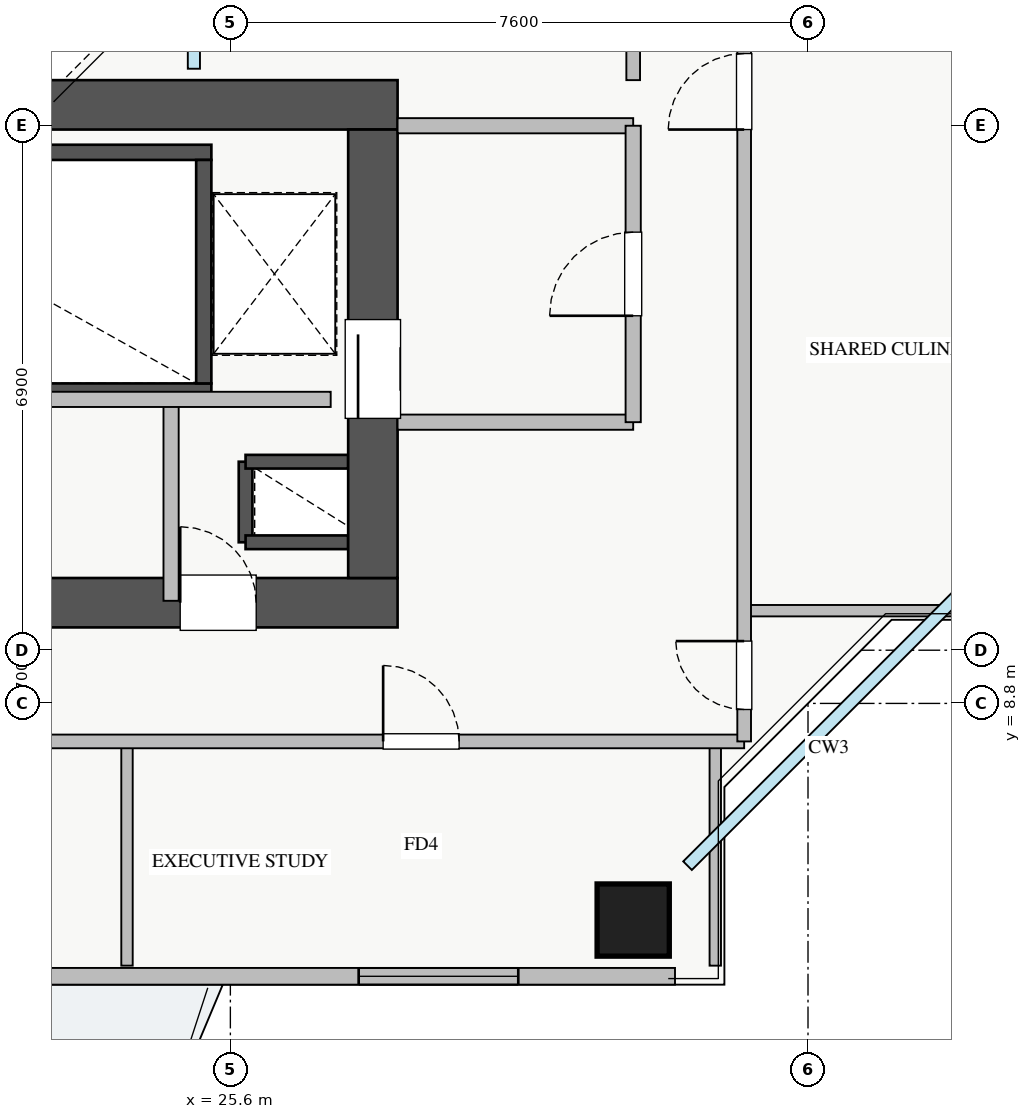
"""IFC4 building model, lengths in metres.
Left out: names, types, materials, properties, quantities, classifications, styles, units other than length and angle.
Written with IfcOpenShell. Run it as: python <this file> out.ifc"""

import sys

from ifc_helpers import new_model, si_unit, direction, frame, frame_2d, origin, origin_2d, place, context, subcontext, project, spatial, rectangle, extrude, source, transform, mapped, element, fill, save


model = new_model("IFC4")
c1 = context("Model", 3, precision=1e-05, world=origin(), true_north=direction((0.0, 1.0)))
c2 = subcontext(c1, "Body", "Model", "MODEL_VIEW")
j1 = project(units=[si_unit("LENGTHUNIT", "METRE"), si_unit("PLANEANGLEUNIT", "RADIAN")], contexts=[c1])
p1 = place(None, origin())
s1 = spatial("IfcSite", under=j1, at=p1, CompositionType="ELEMENT")
p2 = place(p1, origin())
s2 = spatial("IfcBuilding", under=s1, at=p2, CompositionType="ELEMENT")
p3 = place(p2, frame((0.0, 0.0, 147.0)))
s3 = spatial("IfcBuildingStorey", under=s2, at=p3, CompositionType="ELEMENT", Elevation=147.0)
p4 = place(p3, frame((25.8, 10.92, 0.0), z_axis=(0.0, 0.0, 1.0), x_axis=(0.0, 1.0, 0.0)))
e1 = element("IfcWall", 1, at=p4, inside=s3, PredefinedType="SHEAR", context=c2, shape_type="SweptSolid", body=[
    extrude(rectangle(XDim=1.06, YDim=0.18, at=frame_2d((0.53, 0.0))), origin(), (0.0, 0.0, 1.0), 3.07),
])
for number, where, z_axis, x_axis in (
    (2, (25.8, 11.98, 0.0), (0.0, 0.0, 1.0), (1.0, 0.0, 0.0)),
    (3, (25.8, 10.92, 0.0), (0.0, 0.0, 1.0), (1.0, 0.0, 0.0)),
):
    element("IfcWall", number, at=place(p3, frame(where, z_axis=z_axis, x_axis=x_axis)), inside=s3, PredefinedType="SHEAR", context=c2, shape_type="SweptSolid", body=[
        extrude(rectangle(XDim=1.35, YDim=0.18, at=frame_2d((0.675, 0.0))), origin(), (0.0, 0.0, 1.0), 3.07),
    ])
p5 = place(p3, frame((18.2, 12.91, 0.0), z_axis=(0.0, 0.0, 1.0), x_axis=(1.0, 0.0, 0.0)))
e4 = element("IfcWall", 4, at=p5, inside=s3, PredefinedType="SHEAR", context=c2, shape_type="SweptSolid", body=[
    extrude(rectangle(XDim=7.15, YDim=0.2, at=frame_2d((3.575, 0.0))), origin(), (0.0, 0.0, 1.0), 3.25),
])
p6 = place(p5, frame((0.35, 0.0, 0.0)))
e5 = element("IfcOpeningElement", 5, at=p6, cuts=e4, PredefinedType="OPENING", context=c2, shape_type="SweptSolid", body=[
    extrude(rectangle(XDim=1.1, YDim=2.05, at=frame_2d((0.55, 1.025))), frame((0.0, 0.11, 0.0), z_axis=(0.0, -1.0, 0.0), x_axis=(1.0, 0.0, 0.0)), (0.0, 0.0, 1.0), 0.22),
])
p7 = place(p3, frame((18.2, 16.05, 0.0), z_axis=(0.0, 0.0, 1.0), x_axis=(1.0, 0.0, 0.0)))
e6 = element("IfcWall", 6, at=p7, inside=s3, PredefinedType="SHEAR", context=c2, shape_type="SweptSolid", body=[
    extrude(rectangle(XDim=7.15, YDim=0.2, at=frame_2d((3.575, 0.0))), origin(), (0.0, 0.0, 1.0), 3.25),
])
p8 = place(p3, frame((25.25, 13.01, 0.0), z_axis=(0.0, 0.0, 1.0), x_axis=(0.0, 1.0, 0.0)))
e7 = element("IfcWall", 7, at=p8, inside=s3, PredefinedType="SHEAR", context=c2, shape_type="SweptSolid", body=[
    extrude(rectangle(XDim=2.94, YDim=0.2, at=frame_2d((1.47, 0.0))), origin(), (0.0, 0.0, 1.0), 3.25),
])
p9 = place(p3, frame((10.2, 10.125, 0.0), z_axis=(0.0, 0.0, 1.0), x_axis=(1.0, 0.0, 0.0)))
e8 = element("IfcWall", 8, at=p9, inside=s3, PredefinedType="SHEAR", context=c2, shape_type="SweptSolid", body=[
    extrude(rectangle(XDim=17.6, YDim=0.65, at=frame_2d((8.8, 0.0))), origin(), (0.0, 0.0, 1.0), 3.25),
])
p10 = place(p9, frame((1.15, 0.0, 0.0)))
e9 = element("IfcOpeningElement", 9, at=p10, cuts=e8, PredefinedType="OPENING", context=c2, shape_type="SweptSolid", body=[
    extrude(rectangle(XDim=1.1, YDim=2.05, at=frame_2d((0.55, 1.025))), frame((0.0, 0.335, 0.0), z_axis=(0.0, -1.0, 0.0), x_axis=(1.0, 0.0, 0.0)), (0.0, 0.0, 1.0), 0.67),
])
p11 = place(p9, frame((8.3, 0.0, 0.0)))
e10 = element("IfcOpeningElement", 10, at=p11, cuts=e8, PredefinedType="OPENING", context=c2, shape_type="SweptSolid", body=[
    extrude(rectangle(XDim=1.1, YDim=2.05, at=frame_2d((0.55, 1.025))), frame((0.0, 0.335, 0.0), z_axis=(0.0, -1.0, 0.0), x_axis=(1.0, 0.0, 0.0)), (0.0, 0.0, 1.0), 0.67),
])
p12 = place(p9, frame((4.9, 0.0, 0.0)))
e11 = element("IfcOpeningElement", 11, at=p12, cuts=e8, PredefinedType="OPENING", context=c2, shape_type="SweptSolid", body=[
    extrude(rectangle(XDim=1.1, YDim=2.05, at=frame_2d((0.55, 1.025))), frame((0.0, 0.335, 0.0), z_axis=(0.0, -1.0, 0.0), x_axis=(1.0, 0.0, 0.0)), (0.0, 0.0, 1.0), 0.67),
])
p13 = place(p9, frame((14.74, 0.0, 0.0)))
e12 = element("IfcOpeningElement", 12, at=p13, cuts=e8, PredefinedType="OPENING", context=c2, shape_type="SweptSolid", body=[
    extrude(rectangle(XDim=1.0, YDim=2.05, at=frame_2d((0.5, 1.025))), frame((0.0, 0.335, 0.0), z_axis=(0.0, -1.0, 0.0), x_axis=(1.0, 0.0, 0.0)), (0.0, 0.0, 1.0), 0.67),
])
p14 = place(p9, frame((11.67, 0.0, 0.0)))
e13 = element("IfcOpeningElement", 13, at=p14, cuts=e8, PredefinedType="OPENING", context=c2, shape_type="SweptSolid", body=[
    extrude(rectangle(XDim=1.0, YDim=2.05, at=frame_2d((0.5, 1.025))), frame((0.0, 0.335, 0.0), z_axis=(0.0, -1.0, 0.0), x_axis=(1.0, 0.0, 0.0)), (0.0, 0.0, 1.0), 0.67),
])
p15 = place(p3, frame((10.2, 16.675, 0.0), z_axis=(0.0, 0.0, 1.0), x_axis=(1.0, 0.0, 0.0)))
e14 = element("IfcWall", 14, at=p15, inside=s3, PredefinedType="SHEAR", context=c2, shape_type="SweptSolid", body=[
    extrude(rectangle(XDim=17.6, YDim=0.65, at=frame_2d((8.8, 0.0))), origin(), (0.0, 0.0, 1.0), 3.25),
])
p16 = place(p3, frame((27.475, 10.45, 0.0), z_axis=(0.0, 0.0, 1.0), x_axis=(0.0, 1.0, 0.0)))
e15 = element("IfcWall", 15, at=p16, inside=s3, PredefinedType="SHEAR", context=c2, shape_type="SweptSolid", body=[
    extrude(rectangle(XDim=5.9, YDim=0.65, at=frame_2d((2.95, 0.0))), origin(), (0.0, 0.0, 1.0), 3.25),
])
p17 = place(p16, frame((2.1, 0.0, 0.0)))
e16 = element("IfcOpeningElement", 16, at=p17, cuts=e15, PredefinedType="OPENING", context=c2, shape_type="SweptSolid", body=[
    extrude(rectangle(XDim=1.3, YDim=2.05, at=frame_2d((0.65, 1.025))), frame((0.0, 0.335, 0.0), z_axis=(0.0, -1.0, 0.0), x_axis=(1.0, 0.0, 0.0)), (0.0, 0.0, 1.0), 0.67),
])
m1 = source(origin(), c2, "Body", "SweptSolid", [
    extrude(rectangle(XDim=0.95, YDim=0.95, at=origin_2d()), origin(), (0.0, 0.0, 1.0), 3.25),
])
p18 = place(p3, frame((30.9, 5.95, 0.0), z_axis=(0.0, 0.0, 1.0), x_axis=(1.0, 0.0, 0.0)))
e17 = element("IfcColumn", 17, at=p18, inside=s3, PredefinedType="COLUMN", context=c2, shape_type="MappedRepresentation", body=[
    mapped(m1, transform((0.0, 0.0, 0.0), x_axis=(1.0, 0.0, 0.0), y_axis=(0.0, 1.0, 0.0), z_axis=(0.0, 0.0, 1.0), scale=1.0)),
])
p19 = place(p3, frame((6.55, 5.21, 0.0), z_axis=(0.0, 0.0, 1.0), x_axis=(1.0, 0.0, 0.0)))
e18 = element("IfcWall", 18, at=p19, inside=s3, PredefinedType="STANDARD", context=c2, shape_type="SweptSolid", body=[
    extrude(rectangle(XDim=24.9, YDim=0.22, at=frame_2d((12.45, 0.0))), origin(), (0.0, 0.0, 1.0), 2.61),
])
p20 = place(p19, frame((13.3, 0.0, 0.0)))
e19 = element("IfcOpeningElement", 19, at=p20, cuts=e18, PredefinedType="OPENING", context=c2, shape_type="SweptSolid", body=[
    extrude(rectangle(XDim=1.2, YDim=2.1, at=frame_2d((0.6, 1.05))), frame((0.0, 0.12, 0.0), z_axis=(0.0, -1.0, 0.0), x_axis=(1.0, 0.0, 0.0)), (0.0, 0.0, 1.0), 0.24),
])
p21 = place(p19, frame((0.357, 0.0, 0.9)))
e20 = element("IfcOpeningElement", 20, at=p21, cuts=e18, PredefinedType="OPENING", context=c2, shape_type="SweptSolid", body=[
    extrude(rectangle(XDim=1.5, YDim=1.5, at=frame_2d((0.75, 0.75))), frame((0.0, 0.12, 0.0), z_axis=(0.0, -1.0, 0.0), x_axis=(1.0, 0.0, 0.0)), (0.0, 0.0, 1.0), 0.24),
])
p22 = place(p19, frame((6.931, 0.0, 0.9)))
e21 = element("IfcOpeningElement", 21, at=p22, cuts=e18, PredefinedType="OPENING", context=c2, shape_type="SweptSolid", body=[
    extrude(rectangle(XDim=1.8, YDim=1.5, at=frame_2d((0.9, 0.75))), frame((0.0, 0.12, 0.0), z_axis=(0.0, -1.0, 0.0), x_axis=(1.0, 0.0, 0.0)), (0.0, 0.0, 1.0), 0.24),
])
p23 = place(p19, frame((14.813, 0.0, 0.9)))
e22 = element("IfcOpeningElement", 22, at=p23, cuts=e18, PredefinedType="OPENING", context=c2, shape_type="SweptSolid", body=[
    extrude(rectangle(XDim=1.5, YDim=1.45, at=frame_2d((0.75, 0.725))), frame((0.0, 0.12, 0.0), z_axis=(0.0, -1.0, 0.0), x_axis=(1.0, 0.0, 0.0)), (0.0, 0.0, 1.0), 0.24),
])
p24 = place(p19, frame((20.738, 0.0, 0.9)))
e23 = element("IfcOpeningElement", 23, at=p24, cuts=e18, PredefinedType="OPENING", context=c2, shape_type="SweptSolid", body=[
    extrude(rectangle(XDim=2.1, YDim=1.48, at=frame_2d((1.05, 0.74))), frame((0.0, 0.12, 0.0), z_axis=(0.0, -1.0, 0.0), x_axis=(1.0, 0.0, 0.0)), (0.0, 0.0, 1.0), 0.24),
])
p25 = place(p19, frame((4.136, 0.0, 0.9)))
e24 = element("IfcOpeningElement", 24, at=p25, cuts=e18, PredefinedType="OPENING", context=c2, shape_type="SweptSolid", body=[
    extrude(rectangle(XDim=2.4, YDim=1.5, at=frame_2d((1.2, 0.75))), frame((0.0, 0.12, 0.0), z_axis=(0.0, -1.0, 0.0), x_axis=(1.0, 0.0, 0.0)), (0.0, 0.0, 1.0), 0.24),
])
p26 = place(p19, frame((10.038, 0.0, 0.9)))
e25 = element("IfcOpeningElement", 25, at=p26, cuts=e18, PredefinedType="OPENING", context=c2, shape_type="SweptSolid", body=[
    extrude(rectangle(XDim=2.4, YDim=1.5, at=frame_2d((1.2, 0.75))), frame((0.0, 0.12, 0.0), z_axis=(0.0, -1.0, 0.0), x_axis=(1.0, 0.0, 0.0)), (0.0, 0.0, 1.0), 0.24),
])
for number, where, z_axis, x_axis in (
    (26, (27.8, 16.4, 0.0), (0.0, 0.0, 1.0), (1.0, 0.0, 0.0)),
    (27, (27.8, 12.5, 0.0), (0.0, 0.0, 1.0), (1.0, 0.0, 0.0)),
):
    element("IfcWall", number, at=place(p3, frame(where, z_axis=z_axis, x_axis=x_axis)), inside=s3, PredefinedType="PARTITIONING", context=c2, shape_type="SweptSolid", body=[
        extrude(rectangle(XDim=3.1, YDim=0.2, at=frame_2d((1.55, 0.0))), origin(), (0.0, 0.0, 1.0), 3.07),
    ])
p27 = place(p3, frame((30.9, 12.5, 0.0), z_axis=(0.0, 0.0, 1.0), x_axis=(0.0, 1.0, 0.0)))
e28 = element("IfcWall", 28, at=p27, inside=s3, PredefinedType="PARTITIONING", context=c2, shape_type="SweptSolid", body=[
    extrude(rectangle(XDim=3.9, YDim=0.2, at=frame_2d((1.95, 0.0))), origin(), (0.0, 0.0, 1.0), 3.07),
])
p28 = place(p27, frame((1.4, 0.0, 0.0)))
e29 = element("IfcOpeningElement", 29, at=p28, cuts=e28, PredefinedType="OPENING", context=c2, shape_type="SweptSolid", body=[
    extrude(rectangle(XDim=1.1, YDim=2.05, at=frame_2d((0.55, 1.025))), frame((0.0, 0.11, 0.0), z_axis=(0.0, -1.0, 0.0), x_axis=(1.0, 0.0, 0.0)), (0.0, 0.0, 1.0), 0.22),
])
p29 = place(p3, frame((24.82, 10.15, 0.0), z_axis=(0.0, 0.0, 1.0), x_axis=(0.0, 1.0, 0.0)))
e30 = element("IfcWall", 30, at=p29, inside=s3, PredefinedType="PARTITIONING", context=c2, shape_type="SweptSolid", body=[
    extrude(rectangle(XDim=2.65, YDim=0.2, at=frame_2d((1.325, 0.0))), origin(), (0.0, 0.0, 1.0), 3.07),
])
p30 = place(p3, frame((21.75, 12.8, 0.0), z_axis=(0.0, 0.0, 1.0), x_axis=(1.0, 0.0, 0.0)))
e31 = element("IfcWall", 31, at=p30, inside=s3, PredefinedType="PARTITIONING", context=c2, shape_type="SweptSolid", body=[
    extrude(rectangle(XDim=5.17, YDim=0.2, at=frame_2d((2.585, 0.0))), origin(), (0.0, 0.0, 1.0), 3.07),
])
for number, where, z_axis, x_axis in (
    (32, (24.24, 5.35, 0.0), (0.0, 0.0, 1.0), (0.0, 1.0, 0.0)),
    (33, (31.98, 5.35, 0.0), (0.0, 0.0, 1.0), (0.0, 1.0, 0.0)),
):
    element("IfcWall", number, at=place(p3, frame(where, z_axis=z_axis, x_axis=x_axis)), inside=s3, PredefinedType="PARTITIONING", context=c2, shape_type="SweptSolid", body=[
        extrude(rectangle(XDim=2.95, YDim=0.15, at=frame_2d((1.475, 0.0))), origin(), (0.0, 0.0, 1.0), 3.07),
    ])
p31 = place(p3, frame((8.75, 8.3, 0.0), z_axis=(0.0, 0.0, 1.0), x_axis=(1.0, 0.0, 0.0)))
e34 = element("IfcWall", 34, at=p31, inside=s3, PredefinedType="PARTITIONING", context=c2, shape_type="SweptSolid", body=[
    extrude(rectangle(XDim=23.61, YDim=0.18, at=frame_2d((11.805, 0.0))), origin(), (0.0, 0.0, 1.0), 3.07),
])
p32 = place(p31, frame((2.98, 0.0, 0.0)))
e35 = element("IfcOpeningElement", 35, at=p32, cuts=e34, PredefinedType="OPENING", context=c2, shape_type="SweptSolid", body=[
    extrude(rectangle(XDim=1.0, YDim=2.05, at=frame_2d((0.5, 1.025))), frame((0.0, 0.1, 0.0), z_axis=(0.0, -1.0, 0.0), x_axis=(1.0, 0.0, 0.0)), (0.0, 0.0, 1.0), 0.2),
])
p33 = place(p31, frame((10.725, 0.0, 0.0)))
e36 = element("IfcOpeningElement", 36, at=p33, cuts=e34, PredefinedType="OPENING", context=c2, shape_type="SweptSolid", body=[
    extrude(rectangle(XDim=1.0, YDim=2.05, at=frame_2d((0.5, 1.025))), frame((0.0, 0.1, 0.0), z_axis=(0.0, -1.0, 0.0), x_axis=(1.0, 0.0, 0.0)), (0.0, 0.0, 1.0), 0.2),
])
p34 = place(p31, frame((18.86, 0.0, 0.0)))
e37 = element("IfcOpeningElement", 37, at=p34, cuts=e34, PredefinedType="OPENING", context=c2, shape_type="SweptSolid", body=[
    extrude(rectangle(XDim=1.0, YDim=2.05, at=frame_2d((0.5, 1.025))), frame((0.0, 0.1, 0.0), z_axis=(0.0, -1.0, 0.0), x_axis=(1.0, 0.0, 0.0)), (0.0, 0.0, 1.0), 0.2),
])
p35 = place(p3, frame((32.36, 10.02, 0.0), z_axis=(0.0, 0.0, 1.0), x_axis=(1.0, 0.0, 0.0)))
e38 = element("IfcWall", 38, at=p35, inside=s3, PredefinedType="PARTITIONING", context=c2, shape_type="SweptSolid", body=[
    extrude(rectangle(XDim=4.29, YDim=0.15, at=frame_2d((2.145, 0.0))), origin(), (0.0, 0.0, 1.0), 3.07),
])
p36 = place(p3, frame((32.36, 8.3, 0.0), z_axis=(0.0, 0.0, 1.0), x_axis=(0.0, 1.0, 0.0)))
e39 = element("IfcWall", 39, at=p36, inside=s3, PredefinedType="PARTITIONING", context=c2, shape_type="SweptSolid", body=[
    extrude(rectangle(XDim=29.4, YDim=0.18, at=frame_2d((14.7, 0.0))), origin(), (0.0, 0.0, 1.0), 3.07),
])
p37 = place(p36, frame((28.08, 0.0, 0.0)))
e40 = element("IfcOpeningElement", 40, at=p37, cuts=e39, PredefinedType="OPENING", context=c2, shape_type="SweptSolid", body=[
    extrude(rectangle(XDim=0.9, YDim=2.05, at=frame_2d((0.45, 1.025))), frame((0.0, 0.1, 0.0), z_axis=(0.0, -1.0, 0.0), x_axis=(1.0, 0.0, 0.0)), (0.0, 0.0, 1.0), 0.2),
])
p38 = place(p36, frame((0.42, 0.0, 0.0)))
e41 = element("IfcOpeningElement", 41, at=p38, cuts=e39, PredefinedType="OPENING", context=c2, shape_type="SweptSolid", body=[
    extrude(rectangle(XDim=0.9, YDim=2.05, at=frame_2d((0.45, 1.025))), frame((0.0, 0.1, 0.0), z_axis=(0.0, -1.0, 0.0), x_axis=(1.0, 0.0, 0.0)), (0.0, 0.0, 1.0), 0.2),
])
p39 = place(p36, frame((8.05, 0.0, 0.0)))
e42 = element("IfcOpeningElement", 42, at=p39, cuts=e39, PredefinedType="OPENING", context=c2, shape_type="SweptSolid", body=[
    extrude(rectangle(XDim=1.0, YDim=2.05, at=frame_2d((0.5, 1.025))), frame((0.0, 0.1, 0.0), z_axis=(0.0, -1.0, 0.0), x_axis=(1.0, 0.0, 0.0)), (0.0, 0.0, 1.0), 0.2),
])
p40 = place(p36, frame((18.01, 0.0, 0.0)))
e43 = element("IfcOpeningElement", 43, at=p40, cuts=e39, PredefinedType="OPENING", context=c2, shape_type="SweptSolid", body=[
    extrude(rectangle(XDim=1.0, YDim=2.05, at=frame_2d((0.5, 1.025))), frame((0.0, 0.1, 0.0), z_axis=(0.0, -1.0, 0.0), x_axis=(1.0, 0.0, 0.0)), (0.0, 0.0, 1.0), 0.2),
])
p41 = place(p3, frame((30.9, 17.0, 0.0), z_axis=(0.0, 0.0, 1.0), x_axis=(0.0, 1.0, 0.0)))
e44 = element("IfcWall", 44, at=p41, inside=s3, PredefinedType="PARTITIONING", context=c2, shape_type="SweptSolid", body=[
    extrude(rectangle(XDim=12.0, YDim=0.18, at=frame_2d((6.0, 0.0))), origin(), (0.0, 0.0, 1.0), 3.07),
])
p42 = place(p41, frame((2.36, 0.0, 0.0)))
e45 = element("IfcOpeningElement", 45, at=p42, cuts=e44, PredefinedType="OPENING", context=c2, shape_type="SweptSolid", body=[
    extrude(rectangle(XDim=1.0, YDim=2.05, at=frame_2d((0.5, 1.025))), frame((0.0, 0.1, 0.0), z_axis=(0.0, -1.0, 0.0), x_axis=(1.0, 0.0, 0.0)), (0.0, 0.0, 1.0), 0.2),
])
m2 = source(origin(), c2, "Body", "SweptSolid", [
    extrude(rectangle(XDim=2.1, YDim=1.48, at=frame_2d((1.05, 0.74))), frame((0.0, 0.03, 0.0), z_axis=(0.0, -1.0, 0.0), x_axis=(1.0, 0.0, 0.0)), (0.0, 0.0, 1.0), 0.06),
])
p43 = place(p24, origin())
e46 = element("IfcWindow", 46, at=p43, inside=s3, PartitioningType="TRIPLE_PANEL_VERTICAL", PredefinedType="WINDOW", context=c2, shape_type="MappedRepresentation", body=[
    mapped(m2, transform((0.0, 0.0, 0.0), x_axis=(1.0, 0.0, 0.0), y_axis=(0.0, 1.0, 0.0), z_axis=(0.0, 0.0, 1.0), scale=1.0)),
])
fill(e23, e46)
m3 = source(origin(), c2, "Body", "SweptSolid", [
    extrude(rectangle(XDim=1.3, YDim=2.05, at=frame_2d((0.65, 1.025))), frame((0.0, 0.025, 0.0), z_axis=(0.0, -1.0, 0.0), x_axis=(1.0, 0.0, 0.0)), (0.0, 0.0, 1.0), 0.05),
])
p44 = place(p17, origin())
e47 = element("IfcDoor", 47, at=p44, inside=s3, OperationType="SLIDING_TO_RIGHT", PredefinedType="DOOR", context=c2, shape_type="MappedRepresentation", body=[
    mapped(m3, transform((0.0, 0.0, 0.0), x_axis=(1.0, 0.0, 0.0), y_axis=(0.0, 1.0, 0.0), z_axis=(0.0, 0.0, 1.0), scale=1.0)),
])
fill(e16, e47)
m4 = source(origin(), c2, "Body", "SweptSolid", [
    extrude(rectangle(XDim=1.0, YDim=2.05, at=frame_2d((0.5, 1.025))), frame((0.0, 0.025, 0.0), z_axis=(0.0, -1.0, 0.0), x_axis=(1.0, 0.0, 0.0)), (0.0, 0.0, 1.0), 0.05),
])
p45 = place(p13, origin())
e48 = element("IfcDoor", 48, at=p45, inside=s3, OperationType="SINGLE_SWING_LEFT", PredefinedType="DOOR", context=c2, shape_type="MappedRepresentation", body=[
    mapped(m4, transform((0.0, 0.0, 0.0), x_axis=(1.0, 0.0, 0.0), y_axis=(0.0, 1.0, 0.0), z_axis=(0.0, 0.0, 1.0), scale=1.0)),
])
fill(e12, e48)
m5 = source(origin(), c2, "Body", "SweptSolid", [
    extrude(rectangle(XDim=1.1, YDim=2.05, at=frame_2d((0.55, 1.025))), frame((0.0, 0.025, 0.0), z_axis=(0.0, -1.0, 0.0), x_axis=(1.0, 0.0, 0.0)), (0.0, 0.0, 1.0), 0.05),
])
p46 = place(p28, origin())
e49 = element("IfcDoor", 49, at=p46, inside=s3, OperationType="SINGLE_SWING_LEFT", PredefinedType="DOOR", context=c2, shape_type="MappedRepresentation", body=[
    mapped(m5, transform((0.0, 0.0, 0.0), x_axis=(1.0, 0.0, 0.0), y_axis=(0.0, 1.0, 0.0), z_axis=(0.0, 0.0, 1.0), scale=1.0)),
])
fill(e29, e49)
p47 = place(p34, origin())
e50 = element("IfcDoor", 50, at=p47, inside=s3, OperationType="SINGLE_SWING_LEFT", PredefinedType="DOOR", context=c2, shape_type="MappedRepresentation", body=[
    mapped(m4, transform((0.0, 0.0, 0.0), x_axis=(1.0, 0.0, 0.0), y_axis=(0.0, 1.0, 0.0), z_axis=(0.0, 0.0, 1.0), scale=1.0)),
])
fill(e37, e50)
m6 = source(origin(), c2, "Body", "SweptSolid", [
    extrude(rectangle(XDim=0.9, YDim=2.05, at=frame_2d((0.45, 1.025))), frame((0.0, 0.025, 0.0), z_axis=(0.0, -1.0, 0.0), x_axis=(1.0, 0.0, 0.0)), (0.0, 0.0, 1.0), 0.05),
])
p48 = place(p38, origin())
e51 = element("IfcDoor", 51, at=p48, inside=s3, OperationType="SINGLE_SWING_RIGHT", PredefinedType="DOOR", context=c2, shape_type="MappedRepresentation", body=[
    mapped(m6, transform((0.0, 0.0, 0.0), x_axis=(1.0, 0.0, 0.0), y_axis=(0.0, 1.0, 0.0), z_axis=(0.0, 0.0, 1.0), scale=1.0)),
])
fill(e41, e51)
p49 = place(p39, origin())
e52 = element("IfcDoor", 52, at=p49, inside=s3, OperationType="SINGLE_SWING_LEFT", PredefinedType="DOOR", context=c2, shape_type="MappedRepresentation", body=[
    mapped(m4, transform((0.0, 0.0, 0.0), x_axis=(1.0, 0.0, 0.0), y_axis=(0.0, 1.0, 0.0), z_axis=(0.0, 0.0, 1.0), scale=1.0)),
])
fill(e42, e52)
save(model, sys.argv[1])
